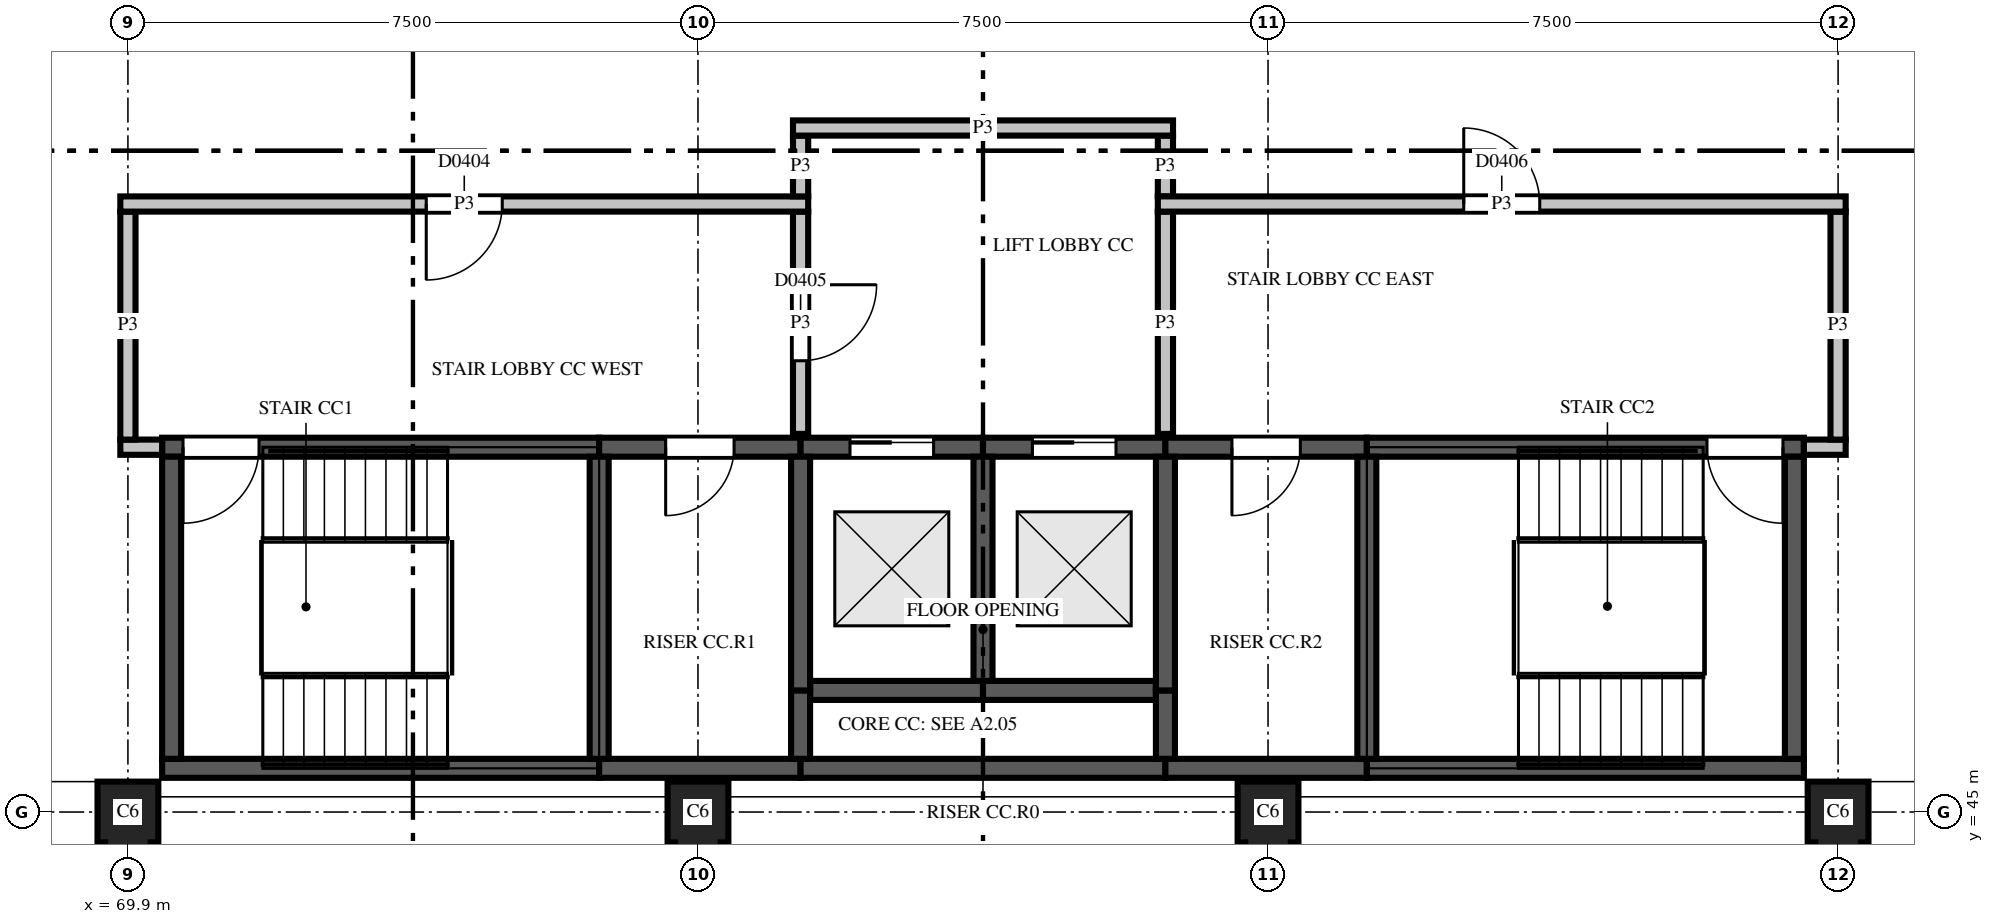
"""IFC4 building model, lengths in metres.
Left out: names, types, materials, properties, quantities, classifications, styles, units other than length and angle.
Written with IfcOpenShell. Run it as: python <this file> out.ifc"""

import sys

from ifc_helpers import new_model, si_unit, direction, frame, frame_2d, origin, place, context, subcontext, project, spatial, polyline, rectangle, outline, extrude, element, fill, save


model = new_model("IFC4")
c1 = context("Model", 3, precision=1e-05, world=origin(), true_north=direction((0.0, 1.0)))
c2 = subcontext(c1, "Body", "Model", "MODEL_VIEW")
j1 = project(units=[si_unit("LENGTHUNIT", "METRE"), si_unit("PLANEANGLEUNIT", "RADIAN")], contexts=[c1])
p1 = place(None, origin())
s1 = spatial("IfcSite", under=j1, at=p1, CompositionType="ELEMENT")
p2 = place(p1, origin())
s2 = spatial("IfcBuilding", under=s1, at=p2, CompositionType="ELEMENT")
p3 = place(p2, frame((0.0, 0.0, 15.6)))
s3 = spatial("IfcBuildingStorey", under=s2, at=p3, CompositionType="ELEMENT", Elevation=15.6)
for number, where, z_axis, x_axis in (
    (1, (69.9, 45.0, 0.0), (0.0, 0.0, 1.0), (0.0, -1.0, 0.0)),
    (2, (77.4, 45.0, 0.0), (0.0, 0.0, 1.0), (0.0, -1.0, 0.0)),
    (3, (84.9, 45.0, 0.0), (0.0, 0.0, 1.0), (0.0, -1.0, 0.0)),
    (4, (92.4, 45.0, 0.0), (0.0, 0.0, 1.0), (0.0, -1.0, 0.0)),
):
    element("IfcColumn", number, at=place(p3, frame(where, z_axis=z_axis, x_axis=x_axis)), inside=s3, PredefinedType="COLUMN", context=c2, shape_type="SweptSolid", body=[
        extrude(outline(polyline([(-0.4, -0.4), (0.4, -0.4), (0.4, -0.3), (0.75, -0.3), (0.75, 0.3), (0.4, 0.3), (0.4, 0.4), (-0.4, 0.4), (-0.4, -0.4)])), origin(), (0.0, 0.0, 1.0), 3.7),
    ])
p4 = place(p3, frame((70.35, 45.575, 0.0), z_axis=(0.0, 0.0, 1.0), x_axis=(1.0, 0.0, 0.0)))
e5 = element("IfcWall", 5, at=p4, inside=s3, PredefinedType="SHEAR", context=c2, shape_type="SweptSolid", body=[
    extrude(rectangle(XDim=5.75, YDim=0.25, at=frame_2d((2.875, 0.0))), origin(), (0.0, 0.0, 1.0), 3.7),
])
p5 = place(p3, frame((76.1, 45.575, 0.0), z_axis=(0.0, 0.0, 1.0), x_axis=(1.0, 0.0, 0.0)))
e6 = element("IfcWall", 6, at=p5, inside=s3, PredefinedType="SHEAR", context=c2, shape_type="SweptSolid", body=[
    extrude(rectangle(XDim=2.65, YDim=0.25, at=frame_2d((1.325, 0.0))), origin(), (0.0, 0.0, 1.0), 3.7),
])
p6 = place(p3, frame((78.75, 45.575, 0.0), z_axis=(0.0, 0.0, 1.0), x_axis=(1.0, 0.0, 0.0)))
e7 = element("IfcWall", 7, at=p6, inside=s3, PredefinedType="SHEAR", context=c2, shape_type="SweptSolid", body=[
    extrude(rectangle(XDim=4.8, YDim=0.25, at=frame_2d((2.4, 0.0))), origin(), (0.0, 0.0, 1.0), 3.7),
])
p7 = place(p3, frame((83.55, 45.575, 0.0), z_axis=(0.0, 0.0, 1.0), x_axis=(1.0, 0.0, 0.0)))
e8 = element("IfcWall", 8, at=p7, inside=s3, PredefinedType="SHEAR", context=c2, shape_type="SweptSolid", body=[
    extrude(rectangle(XDim=2.65, YDim=0.25, at=frame_2d((1.325, 0.0))), origin(), (0.0, 0.0, 1.0), 3.7),
])
p8 = place(p3, frame((86.2, 45.575, 0.0), z_axis=(0.0, 0.0, 1.0), x_axis=(1.0, 0.0, 0.0)))
e9 = element("IfcWall", 9, at=p8, inside=s3, PredefinedType="SHEAR", context=c2, shape_type="SweptSolid", body=[
    extrude(rectangle(XDim=5.75, YDim=0.25, at=frame_2d((2.875, 0.0))), origin(), (0.0, 0.0, 1.0), 3.7),
])
p9 = place(p3, frame((78.875, 46.6, 0.0), z_axis=(0.0, 0.0, 1.0), x_axis=(1.0, 0.0, 0.0)))
e10 = element("IfcWall", 10, at=p9, inside=s3, PredefinedType="SHEAR", context=c2, shape_type="SweptSolid", body=[
    extrude(rectangle(XDim=2.275, YDim=0.25, at=frame_2d((1.137, 0.0))), origin(), (0.0, 0.0, 1.0), 3.7),
])
p10 = place(p3, frame((81.15, 46.6, 0.0), z_axis=(0.0, 0.0, 1.0), x_axis=(1.0, 0.0, 0.0)))
e11 = element("IfcWall", 11, at=p10, inside=s3, PredefinedType="SHEAR", context=c2, shape_type="SweptSolid", body=[
    extrude(rectangle(XDim=2.275, YDim=0.25, at=frame_2d((1.138, 0.0))), origin(), (0.0, 0.0, 1.0), 3.7),
])
p11 = place(p3, frame((70.35, 49.8, 0.0), z_axis=(0.0, 0.0, 1.0), x_axis=(1.0, 0.0, 0.0)))
e12 = element("IfcWall", 12, at=p11, inside=s3, PredefinedType="SHEAR", context=c2, shape_type="SweptSolid", body=[
    extrude(rectangle(XDim=5.75, YDim=0.25, at=frame_2d((2.875, 0.0))), origin(), (0.0, 0.0, 1.0), 3.7),
])
p12 = place(p11, frame((0.275, 0.0, 0.0)))
e13 = element("IfcOpeningElement", 13, at=p12, cuts=e12, PredefinedType="OPENING", context=c2, shape_type="SweptSolid", body=[
    extrude(rectangle(XDim=1.0, YDim=2.1, at=frame_2d((0.5, 1.05))), frame((0.0, 0.135, 0.0), z_axis=(0.0, -1.0, 0.0), x_axis=(1.0, 0.0, 0.0)), (0.0, 0.0, 1.0), 0.27),
])
p13 = place(p3, frame((76.1, 49.8, 0.0), z_axis=(0.0, 0.0, 1.0), x_axis=(1.0, 0.0, 0.0)))
e14 = element("IfcWall", 14, at=p13, inside=s3, PredefinedType="SHEAR", context=c2, shape_type="SweptSolid", body=[
    extrude(rectangle(XDim=2.65, YDim=0.25, at=frame_2d((1.325, 0.0))), origin(), (0.0, 0.0, 1.0), 3.7),
])
p14 = place(p13, frame((0.875, 0.0, 0.0)))
e15 = element("IfcOpeningElement", 15, at=p14, cuts=e14, PredefinedType="OPENING", context=c2, shape_type="SweptSolid", body=[
    extrude(rectangle(XDim=0.9, YDim=2.1, at=frame_2d((0.45, 1.05))), frame((0.0, 0.135, 0.0), z_axis=(0.0, -1.0, 0.0), x_axis=(1.0, 0.0, 0.0)), (0.0, 0.0, 1.0), 0.27),
])
p15 = place(p3, frame((78.75, 49.8, 0.0), z_axis=(0.0, 0.0, 1.0), x_axis=(1.0, 0.0, 0.0)))
e16 = element("IfcWall", 16, at=p15, inside=s3, PredefinedType="SHEAR", context=c2, shape_type="SweptSolid", body=[
    extrude(rectangle(XDim=2.4, YDim=0.25, at=frame_2d((1.2, 0.0))), origin(), (0.0, 0.0, 1.0), 3.7),
])
p16 = place(p15, frame((0.65, 0.0, 0.0)))
e17 = element("IfcOpeningElement", 17, at=p16, cuts=e16, PredefinedType="OPENING", context=c2, shape_type="SweptSolid", body=[
    extrude(rectangle(XDim=1.1, YDim=2.1, at=frame_2d((0.55, 1.05))), frame((0.0, 0.135, 0.0), z_axis=(0.0, -1.0, 0.0), x_axis=(1.0, 0.0, 0.0)), (0.0, 0.0, 1.0), 0.27),
])
p17 = place(p3, frame((81.15, 49.8, 0.0), z_axis=(0.0, 0.0, 1.0), x_axis=(1.0, 0.0, 0.0)))
e18 = element("IfcWall", 18, at=p17, inside=s3, PredefinedType="SHEAR", context=c2, shape_type="SweptSolid", body=[
    extrude(rectangle(XDim=2.4, YDim=0.25, at=frame_2d((1.2, 0.0))), origin(), (0.0, 0.0, 1.0), 3.7),
])
p18 = place(p17, frame((0.65, 0.0, 0.0)))
e19 = element("IfcOpeningElement", 19, at=p18, cuts=e18, PredefinedType="OPENING", context=c2, shape_type="SweptSolid", body=[
    extrude(rectangle(XDim=1.1, YDim=2.1, at=frame_2d((0.55, 1.05))), frame((0.0, 0.135, 0.0), z_axis=(0.0, -1.0, 0.0), x_axis=(1.0, 0.0, 0.0)), (0.0, 0.0, 1.0), 0.27),
])
p19 = place(p3, frame((83.55, 49.8, 0.0), z_axis=(0.0, 0.0, 1.0), x_axis=(1.0, 0.0, 0.0)))
e20 = element("IfcWall", 20, at=p19, inside=s3, PredefinedType="SHEAR", context=c2, shape_type="SweptSolid", body=[
    extrude(rectangle(XDim=2.65, YDim=0.25, at=frame_2d((1.325, 0.0))), origin(), (0.0, 0.0, 1.0), 3.7),
])
p20 = place(p19, frame((0.875, 0.0, 0.0)))
e21 = element("IfcOpeningElement", 21, at=p20, cuts=e20, PredefinedType="OPENING", context=c2, shape_type="SweptSolid", body=[
    extrude(rectangle(XDim=0.9, YDim=2.1, at=frame_2d((0.45, 1.05))), frame((0.0, 0.135, 0.0), z_axis=(0.0, -1.0, 0.0), x_axis=(1.0, 0.0, 0.0)), (0.0, 0.0, 1.0), 0.27),
])
p21 = place(p3, frame((86.2, 49.8, 0.0), z_axis=(0.0, 0.0, 1.0), x_axis=(1.0, 0.0, 0.0)))
e22 = element("IfcWall", 22, at=p21, inside=s3, PredefinedType="SHEAR", context=c2, shape_type="SweptSolid", body=[
    extrude(rectangle(XDim=5.75, YDim=0.25, at=frame_2d((2.875, 0.0))), origin(), (0.0, 0.0, 1.0), 3.7),
])
p22 = place(p21, frame((4.475, 0.0, 0.0)))
e23 = element("IfcOpeningElement", 23, at=p22, cuts=e22, PredefinedType="OPENING", context=c2, shape_type="SweptSolid", body=[
    extrude(rectangle(XDim=1.0, YDim=2.1, at=frame_2d((0.5, 1.05))), frame((0.0, 0.135, 0.0), z_axis=(0.0, -1.0, 0.0), x_axis=(1.0, 0.0, 0.0)), (0.0, 0.0, 1.0), 0.27),
])
for number, where, z_axis, x_axis in (
    (24, (70.475, 45.7, 0.0), (0.0, 0.0, 1.0), (0.0, 1.0, 0.0)),
    (25, (76.1, 45.7, 0.0), (0.0, 0.0, 1.0), (0.0, 1.0, 0.0)),
):
    element("IfcWall", number, at=place(p3, frame(where, z_axis=z_axis, x_axis=x_axis)), inside=s3, PredefinedType="SHEAR", context=c2, shape_type="SweptSolid", body=[
        extrude(rectangle(XDim=3.975, YDim=0.25, at=frame_2d((1.988, 0.0))), origin(), (0.0, 0.0, 1.0), 3.7),
    ])
p23 = place(p3, frame((78.75, 45.7, 0.0), z_axis=(0.0, 0.0, 1.0), x_axis=(0.0, 1.0, 0.0)))
e26 = element("IfcWall", 26, at=p23, inside=s3, PredefinedType="SHEAR", context=c2, shape_type="SweptSolid", body=[
    extrude(rectangle(XDim=0.9, YDim=0.25, at=frame_2d((0.45, 0.0))), origin(), (0.0, 0.0, 1.0), 3.7),
])
p24 = place(p3, frame((78.75, 46.6, 0.0), z_axis=(0.0, 0.0, 1.0), x_axis=(0.0, 1.0, 0.0)))
e27 = element("IfcWall", 27, at=p24, inside=s3, PredefinedType="SHEAR", context=c2, shape_type="SweptSolid", body=[
    extrude(rectangle(XDim=3.075, YDim=0.25, at=frame_2d((1.538, 0.0))), origin(), (0.0, 0.0, 1.0), 3.7),
])
p25 = place(p3, frame((81.15, 46.725, 0.0), z_axis=(0.0, 0.0, 1.0), x_axis=(0.0, 1.0, 0.0)))
e28 = element("IfcWall", 28, at=p25, inside=s3, PredefinedType="SHEAR", context=c2, shape_type="SweptSolid", body=[
    extrude(rectangle(XDim=2.95, YDim=0.25, at=frame_2d((1.475, 0.0))), origin(), (0.0, 0.0, 1.0), 3.7),
])
p26 = place(p3, frame((83.55, 45.7, 0.0), z_axis=(0.0, 0.0, 1.0), x_axis=(0.0, 1.0, 0.0)))
e29 = element("IfcWall", 29, at=p26, inside=s3, PredefinedType="SHEAR", context=c2, shape_type="SweptSolid", body=[
    extrude(rectangle(XDim=0.9, YDim=0.25, at=frame_2d((0.45, 0.0))), origin(), (0.0, 0.0, 1.0), 3.7),
])
p27 = place(p3, frame((83.55, 46.6, 0.0), z_axis=(0.0, 0.0, 1.0), x_axis=(0.0, 1.0, 0.0)))
e30 = element("IfcWall", 30, at=p27, inside=s3, PredefinedType="SHEAR", context=c2, shape_type="SweptSolid", body=[
    extrude(rectangle(XDim=3.075, YDim=0.25, at=frame_2d((1.538, 0.0))), origin(), (0.0, 0.0, 1.0), 3.7),
])
for number, where, z_axis, x_axis in (
    (31, (86.2, 45.7, 0.0), (0.0, 0.0, 1.0), (0.0, 1.0, 0.0)),
    (32, (91.825, 45.7, 0.0), (0.0, 0.0, 1.0), (0.0, 1.0, 0.0)),
):
    element("IfcWall", number, at=place(p3, frame(where, z_axis=z_axis, x_axis=x_axis)), inside=s3, PredefinedType="SHEAR", context=c2, shape_type="SweptSolid", body=[
        extrude(rectangle(XDim=3.975, YDim=0.25, at=frame_2d((1.988, 0.0))), origin(), (0.0, 0.0, 1.0), 3.7),
    ])
for number, where, z_axis, x_axis in (
    (33, (69.8, 49.8, 0.0), (0.0, 0.0, 1.0), (1.0, 0.0, 0.0)),
    (34, (91.95, 49.8, 0.0), (0.0, 0.0, 1.0), (1.0, 0.0, 0.0)),
):
    element("IfcWall", number, at=place(p3, frame(where, z_axis=z_axis, x_axis=x_axis)), inside=s3, PredefinedType="PARTITIONING", context=c2, shape_type="SweptSolid", body=[
        extrude(rectangle(XDim=0.55, YDim=0.2, at=frame_2d((0.275, 0.0))), origin(), (0.0, 0.0, 1.0), 2.88),
    ])
p28 = place(p3, frame((92.4, 49.9, 0.0), z_axis=(0.0, 0.0, 1.0), x_axis=(0.0, 1.0, 0.0)))
e35 = element("IfcWall", 35, at=p28, inside=s3, PredefinedType="PARTITIONING", context=c2, shape_type="SweptSolid", body=[
    extrude(rectangle(XDim=3.0, YDim=0.2, at=frame_2d((1.5, 0.0))), origin(), (0.0, 0.0, 1.0), 2.88),
])
p29 = place(p3, frame((78.75, 49.975, 0.0), z_axis=(0.0, 0.0, 1.0), x_axis=(0.0, 1.0, 0.0)))
e36 = element("IfcWall", 36, at=p29, inside=s3, PredefinedType="PARTITIONING", context=c2, shape_type="SweptSolid", body=[
    extrude(rectangle(XDim=2.925, YDim=0.2, at=frame_2d((1.462, 0.0))), origin(), (0.0, 0.0, 1.0), 2.88),
])
p30 = place(p29, frame((0.962, 0.0, 0.0)))
e37 = element("IfcOpeningElement", 37, at=p30, cuts=e36, PredefinedType="OPENING", context=c2, shape_type="SweptSolid", body=[
    extrude(rectangle(XDim=1.0, YDim=2.1, at=frame_2d((0.5, 1.05))), frame((0.0, 0.11, 0.0), z_axis=(0.0, -1.0, 0.0), x_axis=(1.0, 0.0, 0.0)), (0.0, 0.0, 1.0), 0.22),
])
p31 = place(p3, frame((83.55, 49.975, 0.0), z_axis=(0.0, 0.0, 1.0), x_axis=(0.0, 1.0, 0.0)))
e38 = element("IfcWall", 38, at=p31, inside=s3, PredefinedType="PARTITIONING", context=c2, shape_type="SweptSolid", body=[
    extrude(rectangle(XDim=2.925, YDim=0.2, at=frame_2d((1.462, 0.0))), origin(), (0.0, 0.0, 1.0), 2.88),
])
p32 = place(p3, frame((69.9, 52.9, 0.0), z_axis=(0.0, 0.0, 1.0), x_axis=(0.0, -1.0, 0.0)))
e39 = element("IfcWall", 39, at=p32, inside=s3, PredefinedType="PARTITIONING", context=c2, shape_type="SweptSolid", body=[
    extrude(rectangle(XDim=3.0, YDim=0.2, at=frame_2d((1.5, 0.0))), origin(), (0.0, 0.0, 1.0), 2.88),
])
p33 = place(p3, frame((78.85, 53.0, 0.0), z_axis=(0.0, 0.0, 1.0), x_axis=(-1.0, 0.0, 0.0)))
e40 = element("IfcWall", 40, at=p33, inside=s3, PredefinedType="PARTITIONING", context=c2, shape_type="SweptSolid", body=[
    extrude(rectangle(XDim=9.05, YDim=0.2, at=frame_2d((4.525, 0.0))), origin(), (0.0, 0.0, 1.0), 2.88),
])
p34 = place(p33, frame((4.025, 0.0, 0.0)))
e41 = element("IfcOpeningElement", 41, at=p34, cuts=e40, PredefinedType="OPENING", context=c2, shape_type="SweptSolid", body=[
    extrude(rectangle(XDim=1.0, YDim=2.1, at=frame_2d((0.5, 1.05))), frame((0.0, 0.11, 0.0), z_axis=(0.0, -1.0, 0.0), x_axis=(1.0, 0.0, 0.0)), (0.0, 0.0, 1.0), 0.22),
])
p35 = place(p3, frame((83.55, 53.1, 0.0), z_axis=(0.0, 0.0, 1.0), x_axis=(0.0, 1.0, 0.0)))
e42 = element("IfcWall", 42, at=p35, inside=s3, PredefinedType="PARTITIONING", context=c2, shape_type="SweptSolid", body=[
    extrude(rectangle(XDim=0.8, YDim=0.2, at=frame_2d((0.4, 0.0))), origin(), (0.0, 0.0, 1.0), 2.88),
])
p36 = place(p3, frame((92.5, 53.0, 0.0), z_axis=(0.0, 0.0, 1.0), x_axis=(-1.0, 0.0, 0.0)))
e43 = element("IfcWall", 43, at=p36, inside=s3, PredefinedType="PARTITIONING", context=c2, shape_type="SweptSolid", body=[
    extrude(rectangle(XDim=9.05, YDim=0.2, at=frame_2d((4.525, 0.0))), origin(), (0.0, 0.0, 1.0), 2.88),
])
p37 = place(p36, frame((4.025, 0.0, 0.0)))
e44 = element("IfcOpeningElement", 44, at=p37, cuts=e43, PredefinedType="OPENING", context=c2, shape_type="SweptSolid", body=[
    extrude(rectangle(XDim=1.0, YDim=2.1, at=frame_2d((0.5, 1.05))), frame((0.0, 0.11, 0.0), z_axis=(0.0, -1.0, 0.0), x_axis=(1.0, 0.0, 0.0)), (0.0, 0.0, 1.0), 0.22),
])
p38 = place(p3, frame((78.75, 53.9, 0.0), z_axis=(0.0, 0.0, 1.0), x_axis=(0.0, -1.0, 0.0)))
e45 = element("IfcWall", 45, at=p38, inside=s3, PredefinedType="PARTITIONING", context=c2, shape_type="SweptSolid", body=[
    extrude(rectangle(XDim=0.8, YDim=0.2, at=frame_2d((0.4, 0.0))), origin(), (0.0, 0.0, 1.0), 2.88),
])
p39 = place(p3, frame((83.65, 54.0, 0.0), z_axis=(0.0, 0.0, 1.0), x_axis=(-1.0, 0.0, 0.0)))
e46 = element("IfcWall", 46, at=p39, inside=s3, PredefinedType="PARTITIONING", context=c2, shape_type="SweptSolid", body=[
    extrude(rectangle(XDim=5.0, YDim=0.2, at=frame_2d((2.5, 0.0))), origin(), (0.0, 0.0, 1.0), 2.88),
])
p40 = place(p34, origin())
e47 = element("IfcDoor", 47, at=p40, inside=s3, OperationType="SINGLE_SWING_LEFT", PredefinedType="DOOR", context=c2, shape_type="SweptSolid", body=[
    extrude(rectangle(XDim=1.0, YDim=2.1, at=frame_2d((0.5, 1.05))), frame((0.0, 0.025, 0.0), z_axis=(0.0, -1.0, 0.0), x_axis=(1.0, 0.0, 0.0)), (0.0, 0.0, 1.0), 0.05),
])
fill(e41, e47)
p41 = place(p30, origin())
e48 = element("IfcDoor", 48, at=p41, inside=s3, OperationType="SINGLE_SWING_RIGHT", PredefinedType="DOOR", context=c2, shape_type="SweptSolid", body=[
    extrude(rectangle(XDim=1.0, YDim=2.1, at=frame_2d((0.5, 1.05))), frame((0.0, 0.025, 0.0), z_axis=(0.0, -1.0, 0.0), x_axis=(1.0, 0.0, 0.0)), (0.0, 0.0, 1.0), 0.05),
])
fill(e37, e48)
p42 = place(p37, origin())
e49 = element("IfcDoor", 49, at=p42, inside=s3, OperationType="SINGLE_SWING_RIGHT", PredefinedType="DOOR", context=c2, shape_type="SweptSolid", body=[
    extrude(rectangle(XDim=1.0, YDim=2.1, at=frame_2d((0.5, 1.05))), frame((0.0, 0.025, 0.0), z_axis=(0.0, -1.0, 0.0), x_axis=(1.0, 0.0, 0.0)), (0.0, 0.0, 1.0), 0.05),
])
fill(e44, e49)
p43 = place(p16, origin())
e50 = element("IfcDoor", 50, at=p43, inside=s3, OperationType="SLIDING_TO_LEFT", PredefinedType="DOOR", context=c2, shape_type="SweptSolid", body=[
    extrude(rectangle(XDim=1.1, YDim=2.1, at=frame_2d((0.55, 1.05))), frame((0.0, 0.025, 0.0), z_axis=(0.0, -1.0, 0.0), x_axis=(1.0, 0.0, 0.0)), (0.0, 0.0, 1.0), 0.05),
])
fill(e17, e50)
p44 = place(p18, origin())
e51 = element("IfcDoor", 51, at=p44, inside=s3, OperationType="SLIDING_TO_LEFT", PredefinedType="DOOR", context=c2, shape_type="SweptSolid", body=[
    extrude(rectangle(XDim=1.1, YDim=2.1, at=frame_2d((0.55, 1.05))), frame((0.0, 0.025, 0.0), z_axis=(0.0, -1.0, 0.0), x_axis=(1.0, 0.0, 0.0)), (0.0, 0.0, 1.0), 0.05),
])
fill(e19, e51)
p45 = place(p12, origin())
e52 = element("IfcDoor", 52, at=p45, inside=s3, OperationType="SINGLE_SWING_LEFT", PredefinedType="DOOR", context=c2, shape_type="SweptSolid", body=[
    extrude(rectangle(XDim=1.0, YDim=2.1, at=frame_2d((0.5, 1.05))), frame((0.0, 0.025, 0.0), z_axis=(0.0, -1.0, 0.0), x_axis=(1.0, 0.0, 0.0)), (0.0, 0.0, 1.0), 0.05),
])
fill(e13, e52)
p46 = place(p22, origin())
e53 = element("IfcDoor", 53, at=p46, inside=s3, OperationType="SINGLE_SWING_RIGHT", PredefinedType="DOOR", context=c2, shape_type="SweptSolid", body=[
    extrude(rectangle(XDim=1.0, YDim=2.1, at=frame_2d((0.5, 1.05))), frame((0.0, 0.025, 0.0), z_axis=(0.0, -1.0, 0.0), x_axis=(1.0, 0.0, 0.0)), (0.0, 0.0, 1.0), 0.05),
])
fill(e23, e53)
p47 = place(p14, origin())
e54 = element("IfcDoor", 54, at=p47, inside=s3, OperationType="SINGLE_SWING_LEFT", PredefinedType="DOOR", context=c2, shape_type="SweptSolid", body=[
    extrude(rectangle(XDim=0.9, YDim=2.1, at=frame_2d((0.45, 1.05))), frame((0.0, 0.025, 0.0), z_axis=(0.0, -1.0, 0.0), x_axis=(1.0, 0.0, 0.0)), (0.0, 0.0, 1.0), 0.05),
])
fill(e15, e54)
p48 = place(p20, origin())
e55 = element("IfcDoor", 55, at=p48, inside=s3, OperationType="SINGLE_SWING_LEFT", PredefinedType="DOOR", context=c2, shape_type="SweptSolid", body=[
    extrude(rectangle(XDim=0.9, YDim=2.1, at=frame_2d((0.45, 1.05))), frame((0.0, 0.025, 0.0), z_axis=(0.0, -1.0, 0.0), x_axis=(1.0, 0.0, 0.0)), (0.0, 0.0, 1.0), 0.05),
])
fill(e21, e55)
save(model, sys.argv[1])
